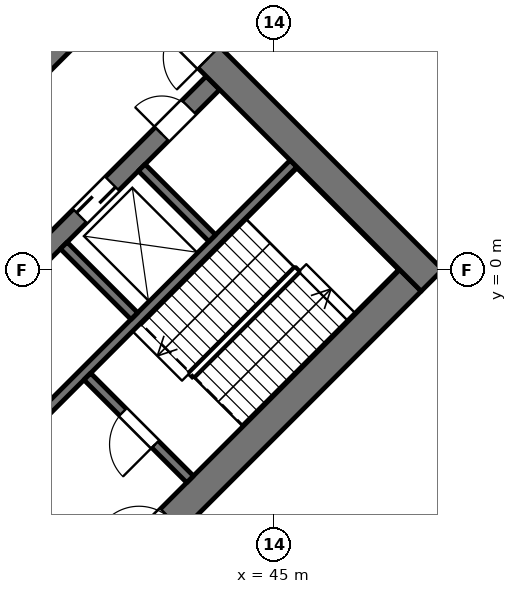
"""IFC4 building model, lengths in metres.
Left out: names, types, materials, properties, quantities, classifications, styles, units other than length and angle.
Written with IfcOpenShell. Run it as: python <this file> out.ifc"""

import sys

from ifc_helpers import new_model, si_unit, direction, frame, frame_2d, origin, place, context, subcontext, project, spatial, rectangle, extrude, element, fill, save


model = new_model("IFC4")
c1 = context("Model", 3, precision=1e-05, world=origin(), true_north=direction((0.0, 1.0)))
c2 = subcontext(c1, "Body", "Model", "MODEL_VIEW")
j1 = project(units=[si_unit("LENGTHUNIT", "METRE"), si_unit("PLANEANGLEUNIT", "RADIAN")], contexts=[c1])
p1 = place(None, origin())
s1 = spatial("IfcSite", under=j1, at=p1, CompositionType="ELEMENT")
p2 = place(p1, origin())
s2 = spatial("IfcBuilding", under=s1, at=p2, CompositionType="ELEMENT")
p3 = place(p2, frame((0.0, 0.0, 7.2)))
s3 = spatial("IfcBuildingStorey", under=s2, at=p3, CompositionType="ELEMENT", Elevation=7.2)
p4 = place(p3, frame((36.283, -12.586, 0.0), z_axis=(0.0, 0.0, 1.0), x_axis=(0.707106781187, 0.707106781187, 0.0)))
e1 = element("IfcWall", 1, at=p4, inside=s3, PredefinedType="SHEAR", context=c2, shape_type="SweptSolid", body=[
    extrude(rectangle(XDim=17.4, YDim=0.8, at=frame_2d((8.7, 0.0))), origin(), (0.0, 0.0, 1.0), 5.1),
])
p5 = place(p4, frame((7.3, 0.0, 0.0)))
e2 = element("IfcOpeningElement", 2, at=p5, cuts=e1, PredefinedType="OPENING", context=c2, shape_type="SweptSolid", body=[
    extrude(rectangle(XDim=1.2, YDim=2.1, at=frame_2d((0.6, 1.05))), frame((0.0, 0.41, 0.0), z_axis=(0.0, -1.0, 0.0), x_axis=(1.0, 0.0, 0.0)), (0.0, 0.0, 1.0), 0.82),
])
p6 = place(p4, frame((1.0, 0.0, 0.0)))
e3 = element("IfcOpeningElement", 3, at=p6, cuts=e1, PredefinedType="OPENING", context=c2, shape_type="SweptSolid", body=[
    extrude(rectangle(XDim=1.0, YDim=2.1, at=frame_2d((0.5, 1.05))), frame((0.0, 0.41, 0.0), z_axis=(0.0, -1.0, 0.0), x_axis=(1.0, 0.0, 0.0)), (0.0, 0.0, 1.0), 0.82),
])
p7 = place(p3, frame((33.207, -9.51, 0.0), z_axis=(0.0, 0.0, 1.0), x_axis=(0.707106781187, 0.707106781187, 0.0)))
e4 = element("IfcWall", 4, at=p7, inside=s3, PredefinedType="SHEAR", context=c2, shape_type="SweptSolid", body=[
    extrude(rectangle(XDim=17.4, YDim=0.25, at=frame_2d((8.7, 0.0))), origin(), (0.0, 0.0, 1.0), 5.1),
])
p8 = place(p3, frame((31.086, -7.389, 0.0), z_axis=(0.0, 0.0, 1.0), x_axis=(0.707106781187, 0.707106781187, 0.0)))
e5 = element("IfcWall", 5, at=p8, inside=s3, PredefinedType="SHEAR", context=c2, shape_type="SweptSolid", body=[
    extrude(rectangle(XDim=17.4, YDim=0.5, at=frame_2d((8.7, 0.0))), origin(), (0.0, 0.0, 1.0), 5.1),
])
p9 = place(p8, frame((12.45, 0.0, 0.0)))
e6 = element("IfcOpeningElement", 6, at=p9, cuts=e5, PredefinedType="OPENING", context=c2, shape_type="SweptSolid", body=[
    extrude(rectangle(XDim=1.2, YDim=2.1, at=frame_2d((0.6, 1.05))), frame((0.0, 0.26, 0.0), z_axis=(0.0, -1.0, 0.0), x_axis=(1.0, 0.0, 0.0)), (0.0, 0.0, 1.0), 0.52),
])
p10 = place(p8, frame((15.5, 0.0, 0.0)))
e7 = element("IfcOpeningElement", 7, at=p10, cuts=e5, PredefinedType="OPENING", context=c2, shape_type="SweptSolid", body=[
    extrude(rectangle(XDim=1.0, YDim=2.1, at=frame_2d((0.5, 1.05))), frame((0.0, 0.26, 0.0), z_axis=(0.0, -1.0, 0.0), x_axis=(1.0, 0.0, 0.0)), (0.0, 0.0, 1.0), 0.52),
])
p11 = place(p3, frame((28.611, -4.914, 0.0), z_axis=(0.0, 0.0, 1.0), x_axis=(0.707106781187, 0.707106781187, 0.0)))
e8 = element("IfcWall", 8, at=p11, inside=s3, PredefinedType="SHEAR", context=c2, shape_type="SweptSolid", body=[
    extrude(rectangle(XDim=17.4, YDim=0.5, at=frame_2d((8.7, 0.0))), origin(), (0.0, 0.0, 1.0), 5.1),
])
p12 = place(p11, frame((0.962, 0.0, 0.0)))
e9 = element("IfcOpeningElement", 9, at=p12, cuts=e8, PredefinedType="OPENING", context=c2, shape_type="SweptSolid", body=[
    extrude(rectangle(XDim=1.1, YDim=2.1, at=frame_2d((0.55, 1.05))), frame((0.0, 0.26, 0.0), z_axis=(0.0, -1.0, 0.0), x_axis=(1.0, 0.0, 0.0)), (0.0, 0.0, 1.0), 0.52),
])
p13 = place(p11, frame((3.8, 0.0, 0.0)))
e10 = element("IfcOpeningElement", 10, at=p13, cuts=e8, PredefinedType="OPENING", context=c2, shape_type="SweptSolid", body=[
    extrude(rectangle(XDim=1.1, YDim=2.1, at=frame_2d((0.55, 1.05))), frame((0.0, 0.26, 0.0), z_axis=(0.0, -1.0, 0.0), x_axis=(1.0, 0.0, 0.0)), (0.0, 0.0, 1.0), 0.52),
])
p14 = place(p11, frame((6.7, 0.0, 0.0)))
e11 = element("IfcOpeningElement", 11, at=p14, cuts=e8, PredefinedType="OPENING", context=c2, shape_type="SweptSolid", body=[
    extrude(rectangle(XDim=1.1, YDim=2.1, at=frame_2d((0.55, 1.05))), frame((0.0, 0.26, 0.0), z_axis=(0.0, -1.0, 0.0), x_axis=(1.0, 0.0, 0.0)), (0.0, 0.0, 1.0), 0.52),
])
p15 = place(p11, frame((9.6, 0.0, 0.0)))
e12 = element("IfcOpeningElement", 12, at=p15, cuts=e8, PredefinedType="OPENING", context=c2, shape_type="SweptSolid", body=[
    extrude(rectangle(XDim=1.1, YDim=2.1, at=frame_2d((0.55, 1.05))), frame((0.0, 0.26, 0.0), z_axis=(0.0, -1.0, 0.0), x_axis=(1.0, 0.0, 0.0)), (0.0, 0.0, 1.0), 0.52),
])
p16 = place(p11, frame((12.5, 0.0, 0.0)))
e13 = element("IfcOpeningElement", 13, at=p16, cuts=e8, PredefinedType="OPENING", context=c2, shape_type="SweptSolid", body=[
    extrude(rectangle(XDim=1.1, YDim=2.1, at=frame_2d((0.55, 1.05))), frame((0.0, 0.26, 0.0), z_axis=(0.0, -1.0, 0.0), x_axis=(1.0, 0.0, 0.0)), (0.0, 0.0, 1.0), 0.52),
])
p17 = place(p11, frame((15.337, 0.0, 0.0)))
e14 = element("IfcOpeningElement", 14, at=p17, cuts=e8, PredefinedType="OPENING", context=c2, shape_type="SweptSolid", body=[
    extrude(rectangle(XDim=1.1, YDim=2.1, at=frame_2d((0.55, 1.05))), frame((0.0, 0.26, 0.0), z_axis=(0.0, -1.0, 0.0), x_axis=(1.0, 0.0, 0.0)), (0.0, 0.0, 1.0), 0.52),
])
p18 = place(p3, frame((40.384, -7.92, 0.0), z_axis=(0.0, 0.0, 1.0), x_axis=(-0.707074866995, 0.707138693938, 0.0)))
e15 = element("IfcWall", 15, at=p18, inside=s3, PredefinedType="SHEAR", context=c2, shape_type="SweptSolid", body=[
    extrude(rectangle(XDim=3.825, YDim=0.25, at=frame_2d((1.913, 0.0))), origin(), (0.0, 0.0, 1.0), 5.1),
])
p19 = place(p18, frame((1.6, 0.0, 0.0)))
e16 = element("IfcOpeningElement", 16, at=p19, cuts=e15, PredefinedType="OPENING", context=c2, shape_type="SweptSolid", body=[
    extrude(rectangle(XDim=1.2, YDim=2.1, at=frame_2d((0.6, 1.05))), frame((0.0, 0.135, 0.0), z_axis=(0.0, -1.0, 0.0), x_axis=(1.0, 0.0, 0.0)), (0.0, 0.0, 1.0), 0.27),
])
p20 = place(p3, frame((42.788, -5.515, 0.0), z_axis=(0.0, 0.0, 1.0), x_axis=(-0.707106781187, 0.707106781187, 0.0)))
e17 = element("IfcWall", 17, at=p20, inside=s3, PredefinedType="SHEAR", context=c2, shape_type="SweptSolid", body=[
    extrude(rectangle(XDim=3.825, YDim=0.25, at=frame_2d((1.913, 0.0))), origin(), (0.0, 0.0, 1.0), 5.1),
])
p21 = place(p20, frame((1.3, 0.0, 0.0)))
e18 = element("IfcOpeningElement", 18, at=p21, cuts=e17, PredefinedType="OPENING", context=c2, shape_type="SweptSolid", body=[
    extrude(rectangle(XDim=1.2, YDim=2.1, at=frame_2d((0.6, 1.05))), frame((0.0, 0.135, 0.0), z_axis=(0.0, -1.0, 0.0), x_axis=(1.0, 0.0, 0.0)), (0.0, 0.0, 1.0), 0.27),
])
for number, where, z_axis, x_axis in (
    (19, (41.321, -1.22, 0.0), (0.0, 0.0, 1.0), (-0.707, 0.707, 0.0)),
    (20, (43.372, 0.831, 0.0), (0.0, 0.0, 1.0), (-0.707, 0.707, 0.0)),
):
    element("IfcWall", number, at=place(p3, frame(where, z_axis=z_axis, x_axis=x_axis)), inside=s3, PredefinedType="SHEAR", context=c2, shape_type="SweptSolid", body=[
        extrude(rectangle(XDim=2.625, YDim=0.25, at=frame_2d((1.312, 0.0))), origin(), (0.0, 0.0, 1.0), 5.1),
    ])
p22 = place(p3, frame((49.152, -0.283, 0.0), z_axis=(0.0, 0.0, 1.0), x_axis=(-0.707106781187, 0.707106781187, 0.0)))
e21 = element("IfcWall", 21, at=p22, inside=s3, PredefinedType="SHEAR", context=c2, shape_type="SweptSolid", body=[
    extrude(rectangle(XDim=19.0, YDim=0.8, at=frame_2d((9.5, 0.0))), origin(), (0.0, 0.0, 1.0), 5.1),
])
p23 = place(p22, frame((8.3, 0.0, 0.0)))
e22 = element("IfcOpeningElement", 22, at=p23, cuts=e21, PredefinedType="OPENING", context=c2, shape_type="SweptSolid", body=[
    extrude(rectangle(XDim=2.4, YDim=2.1, at=frame_2d((1.2, 1.05))), frame((0.0, 0.41, 0.0), z_axis=(0.0, -1.0, 0.0), x_axis=(1.0, 0.0, 0.0)), (0.0, 0.0, 1.0), 0.82),
])
p24 = place(p23, origin())
e23 = element("IfcDoor", 23, at=p24, inside=s3, OperationType="DOUBLE_DOOR_SINGLE_SWING", PredefinedType="DOOR", context=c2, shape_type="SweptSolid", body=[
    extrude(rectangle(XDim=2.4, YDim=2.1, at=frame_2d((1.2, 1.05))), frame((0.0, 0.275, 0.0), z_axis=(0.0, -1.0, 0.0), x_axis=(1.0, 0.0, 0.0)), (0.0, 0.0, 1.0), 0.05),
])
fill(e22, e23)
p25 = place(p9, origin())
e24 = element("IfcDoor", 24, at=p25, inside=s3, OperationType="SLIDING_TO_LEFT", PredefinedType="DOOR", context=c2, shape_type="SweptSolid", body=[
    extrude(rectangle(XDim=1.2, YDim=2.1, at=frame_2d((0.6, 1.05))), frame((0.0, 0.025, 0.0), z_axis=(0.0, -1.0, 0.0), x_axis=(1.0, 0.0, 0.0)), (0.0, 0.0, 1.0), 0.05),
])
fill(e6, e24)
p26 = place(p19, origin())
e25 = element("IfcDoor", 25, at=p26, inside=s3, OperationType="SLIDING_TO_LEFT", PredefinedType="DOOR", context=c2, shape_type="SweptSolid", body=[
    extrude(rectangle(XDim=1.2, YDim=2.1, at=frame_2d((0.6, 1.05))), frame((0.0, 0.025, 0.0), z_axis=(0.0, -1.0, 0.0), x_axis=(1.0, 0.0, 0.0)), (0.0, 0.0, 1.0), 0.05),
])
fill(e16, e25)
p27 = place(p10, origin())
e26 = element("IfcDoor", 26, at=p27, inside=s3, OperationType="SINGLE_SWING_LEFT", PredefinedType="DOOR", context=c2, shape_type="SweptSolid", body=[
    extrude(rectangle(XDim=1.0, YDim=2.1, at=frame_2d((0.5, 1.05))), frame((0.0, 0.025, 0.0), z_axis=(0.0, -1.0, 0.0), x_axis=(1.0, 0.0, 0.0)), (0.0, 0.0, 1.0), 0.05),
])
fill(e7, e26)
p28 = place(p21, origin())
e27 = element("IfcDoor", 27, at=p28, inside=s3, OperationType="SINGLE_SWING_LEFT", PredefinedType="DOOR", context=c2, shape_type="SweptSolid", body=[
    extrude(rectangle(XDim=1.2, YDim=2.1, at=frame_2d((0.6, 1.05))), frame((0.0, 0.025, 0.0), z_axis=(0.0, -1.0, 0.0), x_axis=(1.0, 0.0, 0.0)), (0.0, 0.0, 1.0), 0.05),
])
fill(e18, e27)
p29 = place(p5, origin())
e28 = element("IfcDoor", 28, at=p29, inside=s3, OperationType="SINGLE_SWING_LEFT", PredefinedType="DOOR", context=c2, shape_type="SweptSolid", body=[
    extrude(rectangle(XDim=1.2, YDim=2.1, at=frame_2d((0.6, 1.05))), frame((0.0, 0.275, 0.0), z_axis=(0.0, -1.0, 0.0), x_axis=(1.0, 0.0, 0.0)), (0.0, 0.0, 1.0), 0.05),
])
fill(e2, e28)
save(model, sys.argv[1])
